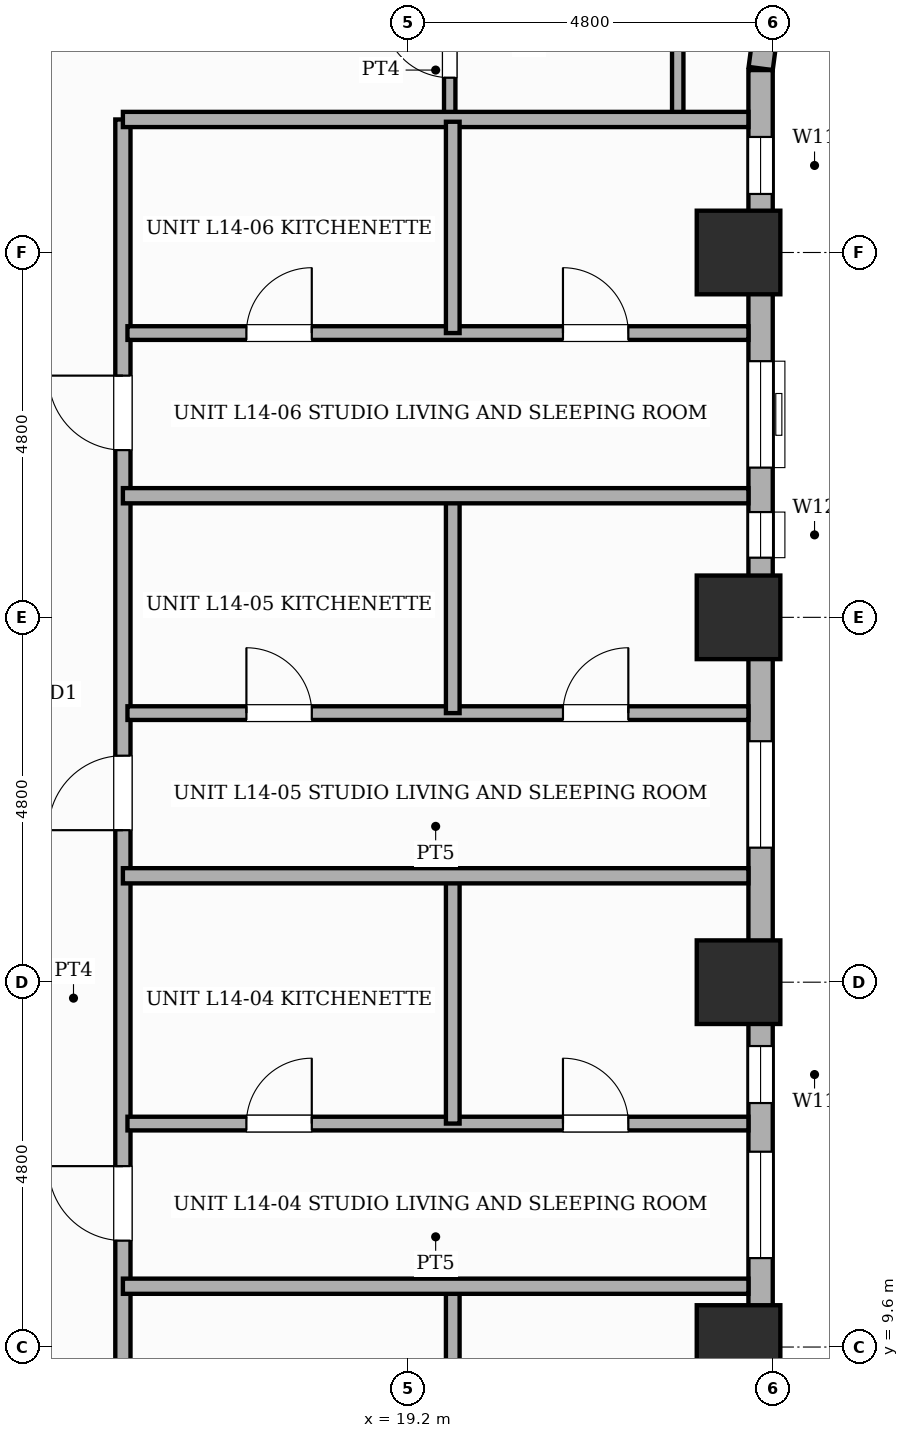
"""IFC4 building model, lengths in metres.
Left out: names, types, materials, properties, quantities, classifications, styles, units other than length and angle.
Written with IfcOpenShell. Run it as: python <this file> out.ifc"""

import sys

from ifc_helpers import new_model, si_unit, direction, frame, frame_2d, origin, origin_2d, place, context, subcontext, project, spatial, rectangle, extrude, element, fill, save


model = new_model("IFC4")
c1 = context("Model", 3, precision=1e-05, world=origin(), true_north=direction((0.0, 1.0)))
c2 = subcontext(c1, "Body", "Model", "MODEL_VIEW")
j1 = project(units=[si_unit("LENGTHUNIT", "METRE"), si_unit("PLANEANGLEUNIT", "RADIAN")], contexts=[c1])
p1 = place(None, origin())
s1 = spatial("IfcSite", under=j1, at=p1, CompositionType="ELEMENT")
p2 = place(p1, origin())
s2 = spatial("IfcBuilding", under=s1, at=p2, CompositionType="ELEMENT")
p3 = place(p2, frame((0.0, 0.0, 57.4)))
s3 = spatial("IfcBuildingStorey", under=s2, at=p3, CompositionType="ELEMENT", Elevation=57.4)
for number, where, z_axis, x_axis in (
    (1, (23.55, 9.6, 0.0), (0.0, 0.0, 1.0), (1.0, 0.0, 0.0)),
    (2, (23.55, 14.4, 0.0), (0.0, 0.0, 1.0), (1.0, 0.0, 0.0)),
    (3, (23.55, 19.2, 0.0), (0.0, 0.0, 1.0), (1.0, 0.0, 0.0)),
    (4, (23.55, 24.0, 0.0), (0.0, 0.0, 1.0), (1.0, 0.0, 0.0)),
):
    element("IfcColumn", number, at=place(p3, frame(where, z_axis=z_axis, x_axis=x_axis)), inside=s3, PredefinedType="COLUMN", context=c2, shape_type="SweptSolid", body=[
        extrude(rectangle(XDim=1.1, YDim=1.1, at=origin_2d()), origin(), (0.0, 0.0, 1.0), 3.6),
    ])
p4 = place(p3, frame((23.923, 27.042, 0.0), z_axis=(0.0, 0.0, 1.0), x_axis=(-0.130555323746, -0.9914410257, 0.0)))
e5 = element("IfcWall", 5, at=p4, inside=s3, PredefinedType="STANDARD", context=c2, shape_type="SweptSolid", body=[
    extrude(rectangle(XDim=0.626, YDim=0.32, at=frame_2d((0.313, 0.0))), origin(), (0.0, 0.0, 1.0), 2.53),
])
p5 = place(p3, frame((23.84, 26.4, 0.0), z_axis=(0.0, 0.0, 1.0), x_axis=(0.0, -1.0, 0.0)))
e6 = element("IfcWall", 6, at=p5, inside=s3, PredefinedType="STANDARD", context=c2, shape_type="SweptSolid", body=[
    extrude(rectangle(XDim=19.2, YDim=0.32, at=frame_2d((9.6, 0.0))), origin(), (0.0, 0.0, 1.0), 2.53),
])
p6 = place(p5, frame((14.23, 0.0, 0.65)))
e7 = element("IfcOpeningElement", 7, at=p6, cuts=e6, PredefinedType="OPENING", context=c2, shape_type="SweptSolid", body=[
    extrude(rectangle(XDim=1.4, YDim=1.1, at=frame_2d((0.7, 0.55))), frame((0.0, 0.17, 0.0), z_axis=(0.0, -1.0, 0.0), x_axis=(1.0, 0.0, 0.0)), (0.0, 0.0, 1.0), 0.34),
])
p7 = place(p5, frame((8.83, 0.0, 0.65)))
e8 = element("IfcOpeningElement", 8, at=p7, cuts=e6, PredefinedType="OPENING", context=c2, shape_type="SweptSolid", body=[
    extrude(rectangle(XDim=1.4, YDim=1.1, at=frame_2d((0.7, 0.55))), frame((0.0, 0.17, 0.0), z_axis=(0.0, -1.0, 0.0), x_axis=(1.0, 0.0, 0.0)), (0.0, 0.0, 1.0), 0.34),
])
p8 = place(p5, frame((3.83, 0.0, 0.65)))
e9 = element("IfcOpeningElement", 9, at=p8, cuts=e6, PredefinedType="OPENING", context=c2, shape_type="SweptSolid", body=[
    extrude(rectangle(XDim=1.4, YDim=1.1, at=frame_2d((0.7, 0.55))), frame((0.0, 0.17, 0.0), z_axis=(0.0, -1.0, 0.0), x_axis=(1.0, 0.0, 0.0)), (0.0, 0.0, 1.0), 0.34),
])
p9 = place(p5, frame((17.639, 0.0, 0.45)))
e10 = element("IfcOpeningElement", 10, at=p9, cuts=e6, PredefinedType="OPENING", context=c2, shape_type="SweptSolid", body=[
    extrude(rectangle(XDim=0.95, YDim=1.8, at=frame_2d((0.475, 0.9))), frame((0.0, 0.17, 0.0), z_axis=(0.0, -1.0, 0.0), x_axis=(1.0, 0.0, 0.0)), (0.0, 0.0, 1.0), 0.34),
])
p10 = place(p5, frame((12.84, 0.0, 0.45)))
e11 = element("IfcOpeningElement", 11, at=p10, cuts=e6, PredefinedType="OPENING", context=c2, shape_type="SweptSolid", body=[
    extrude(rectangle(XDim=0.75, YDim=1.8, at=frame_2d((0.375, 0.9))), frame((0.0, 0.17, 0.0), z_axis=(0.0, -1.0, 0.0), x_axis=(1.0, 0.0, 0.0)), (0.0, 0.0, 1.0), 0.34),
])
p11 = place(p5, frame((5.815, 0.0, 0.45)))
e12 = element("IfcOpeningElement", 12, at=p11, cuts=e6, PredefinedType="OPENING", context=c2, shape_type="SweptSolid", body=[
    extrude(rectangle(XDim=0.6, YDim=1.8, at=frame_2d((0.3, 0.9))), frame((0.0, 0.17, 0.0), z_axis=(0.0, -1.0, 0.0), x_axis=(1.0, 0.0, 0.0)), (0.0, 0.0, 1.0), 0.34),
])
p12 = place(p5, frame((0.88, 0.0, 0.45)))
e13 = element("IfcOpeningElement", 13, at=p12, cuts=e6, PredefinedType="OPENING", context=c2, shape_type="SweptSolid", body=[
    extrude(rectangle(XDim=0.75, YDim=1.8, at=frame_2d((0.375, 0.9))), frame((0.0, 0.17, 0.0), z_axis=(0.0, -1.0, 0.0), x_axis=(1.0, 0.0, 0.0)), (0.0, 0.0, 1.0), 0.34),
])
p13 = place(p3, frame((19.75, 25.75, 0.0), z_axis=(0.0, 0.0, 1.0), x_axis=(0.0, 1.0, 0.0)))
e14 = element("IfcWall", 14, at=p13, inside=s3, PredefinedType="PARTITIONING", context=c2, shape_type="SweptSolid", body=[
    extrude(rectangle(XDim=2.25, YDim=0.15, at=frame_2d((1.125, 0.0))), origin(), (0.0, 0.0, 1.0), 3.35),
])
p14 = place(p13, frame((0.55, 0.0, 0.0)))
e15 = element("IfcOpeningElement", 15, at=p14, cuts=e14, PredefinedType="OPENING", context=c2, shape_type="SweptSolid", body=[
    extrude(rectangle(XDim=0.88, YDim=2.1, at=frame_2d((0.44, 1.05))), frame((0.0, 0.085, 0.0), z_axis=(0.0, -1.0, 0.0), x_axis=(1.0, 0.0, 0.0)), (0.0, 0.0, 1.0), 0.17),
])
p15 = place(p3, frame((22.75, 25.75, 0.0), z_axis=(0.0, 0.0, 1.0), x_axis=(0.0, 1.0, 0.0)))
e16 = element("IfcWall", 16, at=p15, inside=s3, PredefinedType="PARTITIONING", context=c2, shape_type="SweptSolid", body=[
    extrude(rectangle(XDim=2.25, YDim=0.15, at=frame_2d((1.125, 0.0))), origin(), (0.0, 0.0, 1.0), 3.35),
])
p16 = place(p3, frame((15.45, 5.12, 0.0), z_axis=(0.0, 0.0, 1.0), x_axis=(0.0, 1.0, 0.0)))
e17 = element("IfcWall", 17, at=p16, inside=s3, PredefinedType="PARTITIONING", context=c2, shape_type="SweptSolid", body=[
    extrude(rectangle(XDim=20.63, YDim=0.2, at=frame_2d((10.315, 0.0))), origin(), (0.0, 0.0, 1.0), 3.35),
])
p17 = place(p16, frame((1.001, 0.0, 0.0)))
e18 = element("IfcOpeningElement", 18, at=p17, cuts=e17, PredefinedType="OPENING", context=c2, shape_type="SweptSolid", body=[
    extrude(rectangle(XDim=0.98, YDim=2.18, at=frame_2d((0.49, 1.09))), frame((0.0, 0.11, 0.0), z_axis=(0.0, -1.0, 0.0), x_axis=(1.0, 0.0, 0.0)), (0.0, 0.0, 1.0), 0.22),
])
p18 = place(p16, frame((5.88, 0.0, 0.0)))
e19 = element("IfcOpeningElement", 19, at=p18, cuts=e17, PredefinedType="OPENING", context=c2, shape_type="SweptSolid", body=[
    extrude(rectangle(XDim=0.98, YDim=2.18, at=frame_2d((0.49, 1.09))), frame((0.0, 0.11, 0.0), z_axis=(0.0, -1.0, 0.0), x_axis=(1.0, 0.0, 0.0)), (0.0, 0.0, 1.0), 0.22),
])
p19 = place(p16, frame((11.28, 0.0, 0.0)))
e20 = element("IfcOpeningElement", 20, at=p19, cuts=e17, PredefinedType="OPENING", context=c2, shape_type="SweptSolid", body=[
    extrude(rectangle(XDim=0.98, YDim=2.18, at=frame_2d((0.49, 1.09))), frame((0.0, 0.11, 0.0), z_axis=(0.0, -1.0, 0.0), x_axis=(1.0, 0.0, 0.0)), (0.0, 0.0, 1.0), 0.22),
])
p20 = place(p16, frame((16.28, 0.0, 0.0)))
e21 = element("IfcOpeningElement", 21, at=p20, cuts=e17, PredefinedType="OPENING", context=c2, shape_type="SweptSolid", body=[
    extrude(rectangle(XDim=0.98, YDim=2.18, at=frame_2d((0.49, 1.09))), frame((0.0, 0.11, 0.0), z_axis=(0.0, -1.0, 0.0), x_axis=(1.0, 0.0, 0.0)), (0.0, 0.0, 1.0), 0.22),
])
p21 = place(p3, frame((15.45, 25.75, 0.0), z_axis=(0.0, 0.0, 1.0), x_axis=(1.0, 0.0, 0.0)))
e22 = element("IfcWall", 22, at=p21, inside=s3, PredefinedType="PARTITIONING", context=c2, shape_type="SweptSolid", body=[
    extrude(rectangle(XDim=8.23, YDim=0.2, at=frame_2d((4.115, 0.0))), origin(), (0.0, 0.0, 1.0), 3.35),
])
p22 = place(p3, frame((19.79, 7.542, 0.0), z_axis=(0.0, 0.0, 1.0), x_axis=(0.0, 1.0, 0.0)))
e23 = element("IfcWall", 23, at=p22, inside=s3, PredefinedType="PLUMBINGWALL", context=c2, shape_type="SweptSolid", body=[
    extrude(rectangle(XDim=2.898, YDim=0.18, at=frame_2d((1.449, 0.0))), origin(), (0.0, 0.0, 1.0), 3.35),
])
p23 = place(p3, frame((15.45, 10.4, 0.0), z_axis=(0.0, 0.0, 1.0), x_axis=(1.0, 0.0, 0.0)))
e24 = element("IfcWall", 24, at=p23, inside=s3, PredefinedType="SOLIDWALL", context=c2, shape_type="SweptSolid", body=[
    extrude(rectangle(XDim=8.23, YDim=0.2, at=frame_2d((4.115, 0.0))), origin(), (0.0, 0.0, 1.0), 3.35),
])
p24 = place(p3, frame((15.51, 12.54, 0.0), z_axis=(0.0, 0.0, 1.0), x_axis=(1.0, 0.0, 0.0)))
e25 = element("IfcWall", 25, at=p24, inside=s3, PredefinedType="PLUMBINGWALL", context=c2, shape_type="SweptSolid", body=[
    extrude(rectangle(XDim=8.17, YDim=0.18, at=frame_2d((4.085, 0.0))), origin(), (0.0, 0.0, 1.0), 3.35),
])
p25 = place(p24, frame((1.565, 0.0, 0.0)))
e26 = element("IfcOpeningElement", 26, at=p25, cuts=e25, PredefinedType="OPENING", context=c2, shape_type="SweptSolid", body=[
    extrude(rectangle(XDim=0.86, YDim=2.1, at=frame_2d((0.43, 1.05))), frame((0.0, 0.1, 0.0), z_axis=(0.0, -1.0, 0.0), x_axis=(1.0, 0.0, 0.0)), (0.0, 0.0, 1.0), 0.2),
])
p26 = place(p24, frame((5.73, 0.0, 0.0)))
e27 = element("IfcOpeningElement", 27, at=p26, cuts=e25, PredefinedType="OPENING", context=c2, shape_type="SweptSolid", body=[
    extrude(rectangle(XDim=0.86, YDim=2.1, at=frame_2d((0.43, 1.05))), frame((0.0, 0.1, 0.0), z_axis=(0.0, -1.0, 0.0), x_axis=(1.0, 0.0, 0.0)), (0.0, 0.0, 1.0), 0.2),
])
p27 = place(p3, frame((19.79, 12.54, 0.0), z_axis=(0.0, 0.0, 1.0), x_axis=(0.0, 1.0, 0.0)))
e28 = element("IfcWall", 28, at=p27, inside=s3, PredefinedType="PLUMBINGWALL", context=c2, shape_type="SweptSolid", body=[
    extrude(rectangle(XDim=3.3, YDim=0.18, at=frame_2d((1.65, 0.0))), origin(), (0.0, 0.0, 1.0), 3.35),
])
p28 = place(p3, frame((15.45, 15.8, 0.0), z_axis=(0.0, 0.0, 1.0), x_axis=(1.0, 0.0, 0.0)))
e29 = element("IfcWall", 29, at=p28, inside=s3, PredefinedType="SOLIDWALL", context=c2, shape_type="SweptSolid", body=[
    extrude(rectangle(XDim=8.23, YDim=0.2, at=frame_2d((4.115, 0.0))), origin(), (0.0, 0.0, 1.0), 3.35),
])
p29 = place(p3, frame((15.51, 17.94, 0.0), z_axis=(0.0, 0.0, 1.0), x_axis=(1.0, 0.0, 0.0)))
e30 = element("IfcWall", 30, at=p29, inside=s3, PredefinedType="PLUMBINGWALL", context=c2, shape_type="SweptSolid", body=[
    extrude(rectangle(XDim=8.17, YDim=0.18, at=frame_2d((4.085, 0.0))), origin(), (0.0, 0.0, 1.0), 3.35),
])
p30 = place(p29, frame((1.565, 0.0, 0.0)))
e31 = element("IfcOpeningElement", 31, at=p30, cuts=e30, PredefinedType="OPENING", context=c2, shape_type="SweptSolid", body=[
    extrude(rectangle(XDim=0.86, YDim=2.1, at=frame_2d((0.43, 1.05))), frame((0.0, 0.1, 0.0), z_axis=(0.0, -1.0, 0.0), x_axis=(1.0, 0.0, 0.0)), (0.0, 0.0, 1.0), 0.2),
])
p31 = place(p29, frame((5.73, 0.0, 0.0)))
e32 = element("IfcOpeningElement", 32, at=p31, cuts=e30, PredefinedType="OPENING", context=c2, shape_type="SweptSolid", body=[
    extrude(rectangle(XDim=0.86, YDim=2.1, at=frame_2d((0.43, 1.05))), frame((0.0, 0.1, 0.0), z_axis=(0.0, -1.0, 0.0), x_axis=(1.0, 0.0, 0.0)), (0.0, 0.0, 1.0), 0.2),
])
p32 = place(p3, frame((19.79, 17.94, 0.0), z_axis=(0.0, 0.0, 1.0), x_axis=(0.0, 1.0, 0.0)))
e33 = element("IfcWall", 33, at=p32, inside=s3, PredefinedType="PLUMBINGWALL", context=c2, shape_type="SweptSolid", body=[
    extrude(rectangle(XDim=2.9, YDim=0.18, at=frame_2d((1.45, 0.0))), origin(), (0.0, 0.0, 1.0), 3.35),
])
p33 = place(p3, frame((15.45, 20.8, 0.0), z_axis=(0.0, 0.0, 1.0), x_axis=(1.0, 0.0, 0.0)))
e34 = element("IfcWall", 34, at=p33, inside=s3, PredefinedType="SOLIDWALL", context=c2, shape_type="SweptSolid", body=[
    extrude(rectangle(XDim=8.23, YDim=0.2, at=frame_2d((4.115, 0.0))), origin(), (0.0, 0.0, 1.0), 3.35),
])
p34 = place(p3, frame((15.51, 22.94, 0.0), z_axis=(0.0, 0.0, 1.0), x_axis=(1.0, 0.0, 0.0)))
e35 = element("IfcWall", 35, at=p34, inside=s3, PredefinedType="PLUMBINGWALL", context=c2, shape_type="SweptSolid", body=[
    extrude(rectangle(XDim=8.17, YDim=0.18, at=frame_2d((4.085, 0.0))), origin(), (0.0, 0.0, 1.0), 3.35),
])
p35 = place(p34, frame((1.565, 0.0, 0.0)))
e36 = element("IfcOpeningElement", 36, at=p35, cuts=e35, PredefinedType="OPENING", context=c2, shape_type="SweptSolid", body=[
    extrude(rectangle(XDim=0.86, YDim=2.1, at=frame_2d((0.43, 1.05))), frame((0.0, 0.1, 0.0), z_axis=(0.0, -1.0, 0.0), x_axis=(1.0, 0.0, 0.0)), (0.0, 0.0, 1.0), 0.2),
])
p36 = place(p34, frame((5.73, 0.0, 0.0)))
e37 = element("IfcOpeningElement", 37, at=p36, cuts=e35, PredefinedType="OPENING", context=c2, shape_type="SweptSolid", body=[
    extrude(rectangle(XDim=0.86, YDim=2.1, at=frame_2d((0.43, 1.05))), frame((0.0, 0.1, 0.0), z_axis=(0.0, -1.0, 0.0), x_axis=(1.0, 0.0, 0.0)), (0.0, 0.0, 1.0), 0.2),
])
p37 = place(p3, frame((19.79, 22.94, 0.0), z_axis=(0.0, 0.0, 1.0), x_axis=(0.0, 1.0, 0.0)))
e38 = element("IfcWall", 38, at=p37, inside=s3, PredefinedType="PLUMBINGWALL", context=c2, shape_type="SweptSolid", body=[
    extrude(rectangle(XDim=2.78, YDim=0.18, at=frame_2d((1.39, 0.0))), origin(), (0.0, 0.0, 1.0), 3.35),
])
p38 = place(p6, origin())
e39 = element("IfcWindow", 39, at=p38, inside=s3, PartitioningType="SINGLE_PANEL", PredefinedType="WINDOW", context=c2, shape_type="SweptSolid", body=[
    extrude(rectangle(XDim=1.4, YDim=1.1, at=frame_2d((0.7, 0.55))), frame((0.0, 0.03, 0.0), z_axis=(0.0, -1.0, 0.0), x_axis=(1.0, 0.0, 0.0)), (0.0, 0.0, 1.0), 0.06),
])
fill(e7, e39)
p39 = place(p7, origin())
e40 = element("IfcWindow", 40, at=p39, inside=s3, PartitioningType="SINGLE_PANEL", PredefinedType="WINDOW", context=c2, shape_type="SweptSolid", body=[
    extrude(rectangle(XDim=1.4, YDim=1.1, at=frame_2d((0.7, 0.55))), frame((0.0, 0.03, 0.0), z_axis=(0.0, -1.0, 0.0), x_axis=(1.0, 0.0, 0.0)), (0.0, 0.0, 1.0), 0.06),
])
fill(e8, e40)
p40 = place(p8, origin())
e41 = element("IfcWindow", 41, at=p40, inside=s3, PartitioningType="SINGLE_PANEL", PredefinedType="WINDOW", context=c2, shape_type="SweptSolid", body=[
    extrude(rectangle(XDim=1.4, YDim=1.1, at=frame_2d((0.7, 0.55))), frame((0.0, 0.03, 0.0), z_axis=(0.0, -1.0, 0.0), x_axis=(1.0, 0.0, 0.0)), (0.0, 0.0, 1.0), 0.06),
])
fill(e9, e41)
p41 = place(p10, origin())
e42 = element("IfcWindow", 42, at=p41, inside=s3, PartitioningType="SINGLE_PANEL", PredefinedType="WINDOW", context=c2, shape_type="SweptSolid", body=[
    extrude(rectangle(XDim=0.75, YDim=1.8, at=frame_2d((0.375, 0.9))), frame((0.0, 0.03, 0.0), z_axis=(0.0, -1.0, 0.0), x_axis=(1.0, 0.0, 0.0)), (0.0, 0.0, 1.0), 0.06),
])
fill(e11, e42)
p42 = place(p11, origin())
e43 = element("IfcWindow", 43, at=p42, inside=s3, PartitioningType="SINGLE_PANEL", PredefinedType="WINDOW", context=c2, shape_type="SweptSolid", body=[
    extrude(rectangle(XDim=0.6, YDim=1.8, at=frame_2d((0.3, 0.9))), frame((0.0, 0.03, 0.0), z_axis=(0.0, -1.0, 0.0), x_axis=(1.0, 0.0, 0.0)), (0.0, 0.0, 1.0), 0.06),
])
fill(e12, e43)
p43 = place(p12, origin())
e44 = element("IfcWindow", 44, at=p43, inside=s3, PartitioningType="SINGLE_PANEL", PredefinedType="WINDOW", context=c2, shape_type="SweptSolid", body=[
    extrude(rectangle(XDim=0.75, YDim=1.8, at=frame_2d((0.375, 0.9))), frame((0.0, 0.03, 0.0), z_axis=(0.0, -1.0, 0.0), x_axis=(1.0, 0.0, 0.0)), (0.0, 0.0, 1.0), 0.06),
])
fill(e13, e44)
p44 = place(p14, origin())
e45 = element("IfcDoor", 45, at=p44, inside=s3, OperationType="SINGLE_SWING_RIGHT", PredefinedType="DOOR", context=c2, shape_type="SweptSolid", body=[
    extrude(rectangle(XDim=0.88, YDim=2.1, at=frame_2d((0.44, 1.05))), frame((0.0, 0.025, 0.0), z_axis=(0.0, -1.0, 0.0), x_axis=(1.0, 0.0, 0.0)), (0.0, 0.0, 1.0), 0.05),
])
fill(e15, e45)
p45 = place(p18, origin())
e46 = element("IfcDoor", 46, at=p45, inside=s3, OperationType="SINGLE_SWING_RIGHT", PredefinedType="DOOR", context=c2, shape_type="SweptSolid", body=[
    extrude(rectangle(XDim=0.98, YDim=2.18, at=frame_2d((0.49, 1.09))), frame((0.0, 0.025, 0.0), z_axis=(0.0, -1.0, 0.0), x_axis=(1.0, 0.0, 0.0)), (0.0, 0.0, 1.0), 0.05),
])
fill(e19, e46)
p46 = place(p25, origin())
e47 = element("IfcDoor", 47, at=p46, inside=s3, OperationType="SINGLE_SWING_RIGHT", PredefinedType="DOOR", context=c2, shape_type="SweptSolid", body=[
    extrude(rectangle(XDim=0.86, YDim=2.1, at=frame_2d((0.43, 1.05))), frame((0.0, 0.025, 0.0), z_axis=(0.0, -1.0, 0.0), x_axis=(1.0, 0.0, 0.0)), (0.0, 0.0, 1.0), 0.05),
])
fill(e26, e47)
p47 = place(p26, origin())
e48 = element("IfcDoor", 48, at=p47, inside=s3, OperationType="SINGLE_SWING_LEFT", PredefinedType="DOOR", context=c2, shape_type="SweptSolid", body=[
    extrude(rectangle(XDim=0.86, YDim=2.1, at=frame_2d((0.43, 1.05))), frame((0.0, 0.025, 0.0), z_axis=(0.0, -1.0, 0.0), x_axis=(1.0, 0.0, 0.0)), (0.0, 0.0, 1.0), 0.05),
])
fill(e27, e48)
p48 = place(p19, origin())
e49 = element("IfcDoor", 49, at=p48, inside=s3, OperationType="SINGLE_SWING_LEFT", PredefinedType="DOOR", context=c2, shape_type="SweptSolid", body=[
    extrude(rectangle(XDim=0.98, YDim=2.18, at=frame_2d((0.49, 1.09))), frame((0.0, 0.025, 0.0), z_axis=(0.0, -1.0, 0.0), x_axis=(1.0, 0.0, 0.0)), (0.0, 0.0, 1.0), 0.05),
])
fill(e20, e49)
p49 = place(p30, origin())
e50 = element("IfcDoor", 50, at=p49, inside=s3, OperationType="SINGLE_SWING_LEFT", PredefinedType="DOOR", context=c2, shape_type="SweptSolid", body=[
    extrude(rectangle(XDim=0.86, YDim=2.1, at=frame_2d((0.43, 1.05))), frame((0.0, 0.025, 0.0), z_axis=(0.0, -1.0, 0.0), x_axis=(1.0, 0.0, 0.0)), (0.0, 0.0, 1.0), 0.05),
])
fill(e31, e50)
p50 = place(p31, origin())
e51 = element("IfcDoor", 51, at=p50, inside=s3, OperationType="SINGLE_SWING_RIGHT", PredefinedType="DOOR", context=c2, shape_type="SweptSolid", body=[
    extrude(rectangle(XDim=0.86, YDim=2.1, at=frame_2d((0.43, 1.05))), frame((0.0, 0.025, 0.0), z_axis=(0.0, -1.0, 0.0), x_axis=(1.0, 0.0, 0.0)), (0.0, 0.0, 1.0), 0.05),
])
fill(e32, e51)
p51 = place(p20, origin())
e52 = element("IfcDoor", 52, at=p51, inside=s3, OperationType="SINGLE_SWING_RIGHT", PredefinedType="DOOR", context=c2, shape_type="SweptSolid", body=[
    extrude(rectangle(XDim=0.98, YDim=2.18, at=frame_2d((0.49, 1.09))), frame((0.0, 0.025, 0.0), z_axis=(0.0, -1.0, 0.0), x_axis=(1.0, 0.0, 0.0)), (0.0, 0.0, 1.0), 0.05),
])
fill(e21, e52)
p52 = place(p35, origin())
e53 = element("IfcDoor", 53, at=p52, inside=s3, OperationType="SINGLE_SWING_RIGHT", PredefinedType="DOOR", context=c2, shape_type="SweptSolid", body=[
    extrude(rectangle(XDim=0.86, YDim=2.1, at=frame_2d((0.43, 1.05))), frame((0.0, 0.025, 0.0), z_axis=(0.0, -1.0, 0.0), x_axis=(1.0, 0.0, 0.0)), (0.0, 0.0, 1.0), 0.05),
])
fill(e36, e53)
p53 = place(p36, origin())
e54 = element("IfcDoor", 54, at=p53, inside=s3, OperationType="SINGLE_SWING_LEFT", PredefinedType="DOOR", context=c2, shape_type="SweptSolid", body=[
    extrude(rectangle(XDim=0.86, YDim=2.1, at=frame_2d((0.43, 1.05))), frame((0.0, 0.025, 0.0), z_axis=(0.0, -1.0, 0.0), x_axis=(1.0, 0.0, 0.0)), (0.0, 0.0, 1.0), 0.05),
])
fill(e37, e54)
save(model, sys.argv[1])
